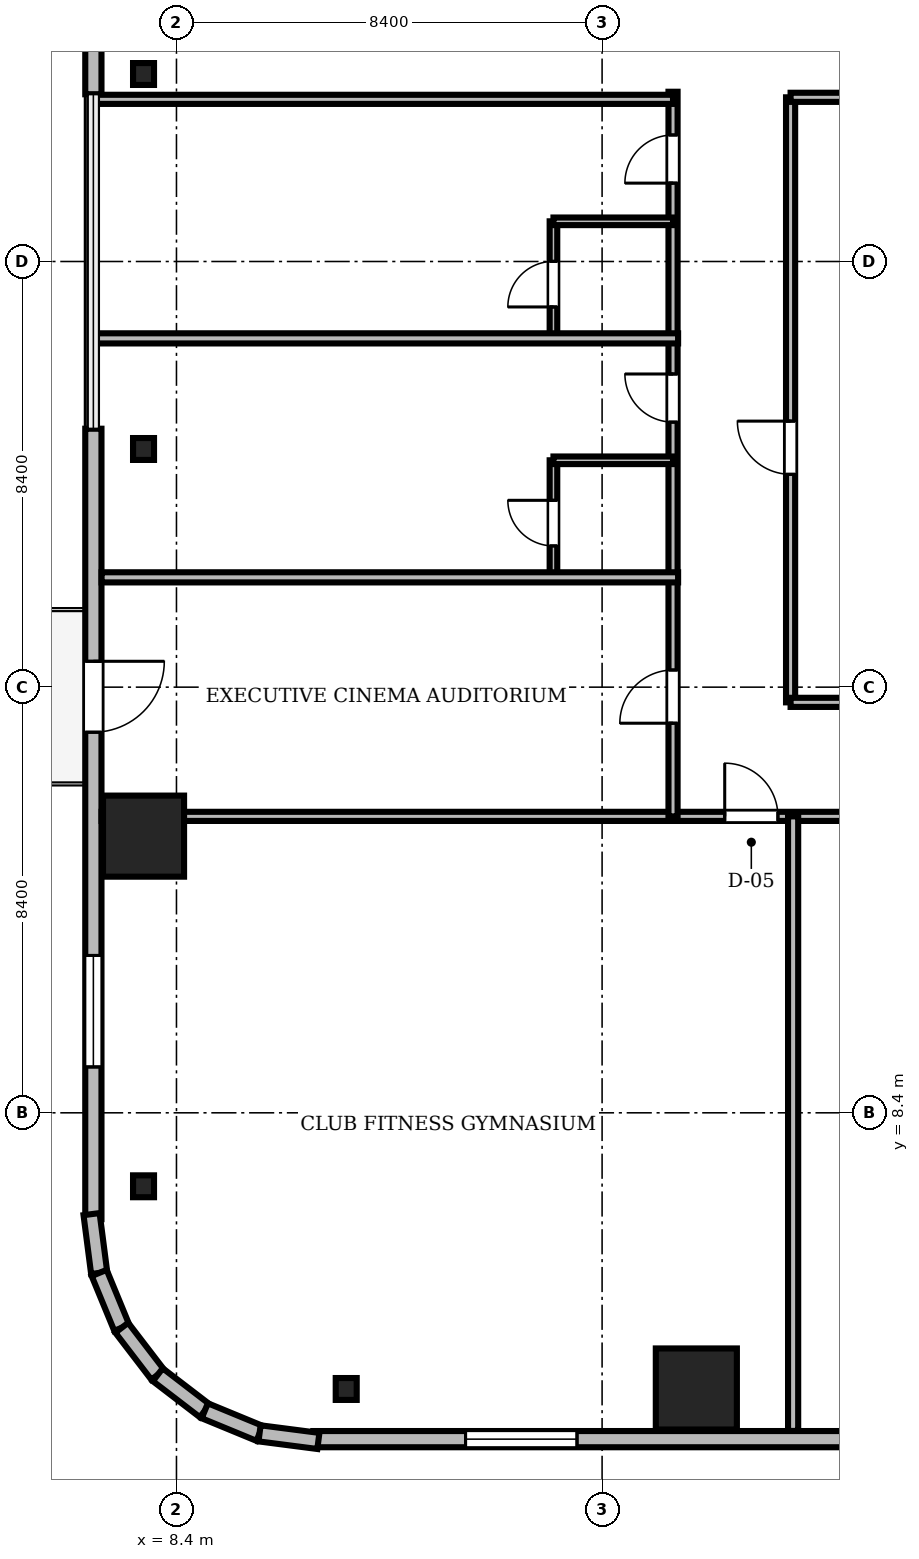
"""IFC4 building model, lengths in metres.
Left out: names, types, materials, properties, quantities, classifications, styles, units other than length and angle.
Written with IfcOpenShell. Run it as: python <this file> out.ifc"""

import sys

from ifc_helpers import new_model, si_unit, direction, frame, frame_2d, origin, origin_2d, place, context, subcontext, project, spatial, rectangle, i_section, extrude, source, transform, mapped, element, fill, save


model = new_model("IFC4")
c1 = context("Model", 3, precision=1e-05, world=origin(), true_north=direction((0.0, 1.0)))
c2 = subcontext(c1, "Body", "Model", "MODEL_VIEW")
j1 = project(units=[si_unit("LENGTHUNIT", "METRE"), si_unit("PLANEANGLEUNIT", "RADIAN")], contexts=[c1])
p1 = place(None, origin())
s1 = spatial("IfcSite", under=j1, at=p1, CompositionType="ELEMENT")
p2 = place(p1, origin())
s2 = spatial("IfcBuilding", under=s1, at=p2, CompositionType="ELEMENT")
p3 = place(p2, frame((0.0, 0.0, 129.8)))
s3 = spatial("IfcBuildingStorey", under=s2, at=p3, CompositionType="ELEMENT", Elevation=129.8)
m1 = source(origin(), c2, "Body", "SweptSolid", [
    extrude(rectangle(XDim=1.6, YDim=1.6, at=origin_2d()), origin(), (0.0, 0.0, 1.0), 3.46),
])
for number, where, z_axis, x_axis in (
    (1, (18.66, 2.95, 0.0), (0.0, 0.0, 1.0), (1.0, 0.0, 0.0)),
    (2, (7.75, 13.86, 0.0), (0.0, 0.0, 1.0), (1.0, 0.0, 0.0)),
):
    element("IfcColumn", number, at=place(p3, frame(where, z_axis=z_axis, x_axis=x_axis)), inside=s3, PredefinedType="COLUMN", context=c2, shape_type="MappedRepresentation", body=[
        mapped(m1, transform((0.0, 0.0, 0.0), scale=1.0)),
    ])
m2 = source(origin(), c2, "Body", "SweptSolid", [
    extrude(i_section(OverallWidth=0.414, OverallDepth=0.432, WebThickness=0.026, FlangeThickness=0.04, FilletRadius=0.015, at=origin_2d()), origin(), (0.0, 0.0, 1.0), 3.46),
])
for number, where, z_axis, x_axis in (
    (3, (11.75, 2.95, 0.0), (0.0, 0.0, 1.0), (1.0, 0.0, 0.0)),
    (4, (7.75, 28.9, 0.0), (0.0, 0.0, 1.0), (1.0, 0.0, 0.0)),
    (5, (7.75, 21.5, 0.0), (0.0, 0.0, 1.0), (1.0, 0.0, 0.0)),
    (6, (7.75, 6.95, 0.0), (0.0, 0.0, 1.0), (1.0, 0.0, 0.0)),
):
    element("IfcColumn", number, at=place(p3, frame(where, z_axis=z_axis, x_axis=x_axis)), inside=s3, PredefinedType="COLUMN", context=c2, shape_type="MappedRepresentation", body=[
        mapped(m2, transform((0.0, 0.0, 0.0), scale=1.0)),
    ])
m3 = source(origin(), c2, "Body", "SweptSolid", [
    extrude(rectangle(XDim=15.6, YDim=0.32, at=frame_2d((7.8, 0.0))), origin(), (0.0, 0.0, 1.0), 3.46),
])
p4 = place(p3, frame((11.1, 1.96, 0.0), z_axis=(0.0, 0.0, 1.0), x_axis=(1.0, 0.0, 0.0)))
e7 = element("IfcWall", 7, at=p4, inside=s3, PredefinedType="SOLIDWALL", context=c2, shape_type="MappedRepresentation", body=[
    mapped(m3, transform((0.0, 0.0, 0.0), scale=1.0)),
])
m4 = source(origin(), c2, "Body", "SweptSolid", [
    extrude(rectangle(XDim=2.2, YDim=2.4, at=frame_2d((1.1, 1.2))), frame((0.0, 0.17, 0.0), z_axis=(0.0, -1.0, 0.0), x_axis=(1.0, 0.0, 0.0)), (0.0, 0.0, 1.0), 0.34),
])
p5 = place(p4, frame((3.005, 0.0, 0.72)))
e8 = element("IfcOpeningElement", 8, at=p5, cuts=e7, PredefinedType="OPENING", context=c2, shape_type="MappedRepresentation", body=[
    mapped(m4, transform((0.0, 0.0, 0.0), scale=1.0)),
])
m5 = source(origin(), c2, "Body", "SweptSolid", [
    extrude(rectangle(XDim=15.6, YDim=0.32, at=frame_2d((7.8, 0.0))), origin(), (0.0, 0.0, 1.0), 3.46),
])
p6 = place(p3, frame((6.76, 44.1, 0.0), z_axis=(0.0, 0.0, 1.0), x_axis=(0.0, -1.0, 0.0)))
e9 = element("IfcWall", 9, at=p6, inside=s3, PredefinedType="SOLIDWALL", context=c2, shape_type="MappedRepresentation", body=[
    mapped(m5, transform((0.0, 0.0, 0.0), scale=1.0)),
])
p7 = place(p6, frame((3.005, 0.0, 0.72)))
e10 = element("IfcOpeningElement", 10, at=p7, cuts=e9, PredefinedType="OPENING", context=c2, shape_type="MappedRepresentation", body=[
    mapped(m4, transform((0.0, 0.0, 0.0), scale=1.0)),
])
p8 = place(p3, frame((6.76, 21.9, 0.0), z_axis=(0.0, 0.0, 1.0), x_axis=(0.0, -1.0, 0.0)))
e11 = element("IfcWall", 11, at=p8, inside=s3, PredefinedType="SOLIDWALL", context=c2, shape_type="MappedRepresentation", body=[
    mapped(m3, transform((0.0, 0.0, 0.0), scale=1.0)),
])
m6 = source(origin(), c2, "Body", "SweptSolid", [
    extrude(rectangle(XDim=1.4, YDim=2.3, at=frame_2d((0.7, 1.15))), frame((0.0, 0.17, 0.0), z_axis=(0.0, -1.0, 0.0), x_axis=(1.0, 0.0, 0.0)), (0.0, 0.0, 1.0), 0.34),
])
p9 = place(p8, frame((4.59, 0.0, 0.0)))
e12 = element("IfcOpeningElement", 12, at=p9, cuts=e11, PredefinedType="OPENING", context=c2, shape_type="MappedRepresentation", body=[
    mapped(m6, transform((0.0, 0.0, 0.0), scale=1.0)),
])
p10 = place(p8, frame((10.395, 0.0, 0.72)))
e13 = element("IfcOpeningElement", 13, at=p10, cuts=e11, PredefinedType="OPENING", context=c2, shape_type="MappedRepresentation", body=[
    mapped(m4, transform((0.0, 0.0, 0.0), scale=1.0)),
])
m7 = source(origin(), c2, "Body", "SweptSolid", [
    extrude(rectangle(XDim=1.171, YDim=0.32, at=frame_2d((0.585, 0.0))), origin(), (0.0, 0.0, 1.0), 3.46),
])
p11 = place(p3, frame((6.724, 6.401, 0.0), z_axis=(0.0, 0.0, 1.0), x_axis=(0.128269133229, -0.991739395941, 0.0)))
e14 = element("IfcWall", 14, at=p11, inside=s3, PredefinedType="SOLIDWALL", context=c2, shape_type="MappedRepresentation", body=[
    mapped(m7, transform((0.0, 0.0, 0.0), scale=1.0)),
])
m8 = source(origin(), c2, "Body", "SweptSolid", [
    extrude(rectangle(XDim=1.169, YDim=0.32, at=frame_2d((0.584, 0.0))), origin(), (0.0, 0.0, 1.0), 3.46),
])
for number, where, z_axis, x_axis in (
    (15, (6.875, 5.24, 0.0), (0.0, 0.0, 1.0), (0.381, -0.925, 0.0)),
    (16, (7.32, 4.159, 0.0), (0.0, 0.0, 1.0), (0.608, -0.794, 0.0)),
):
    element("IfcWall", number, at=place(p3, frame(where, z_axis=z_axis, x_axis=x_axis)), inside=s3, PredefinedType="SOLIDWALL", context=c2, shape_type="MappedRepresentation", body=[
        mapped(m8, transform((0.0, 0.0, 0.0), scale=1.0)),
    ])
m9 = source(origin(), c2, "Body", "SweptSolid", [
    extrude(rectangle(XDim=1.169, YDim=0.32, at=frame_2d((0.584, 0.0))), origin(), (0.0, 0.0, 1.0), 3.46),
])
p12 = place(p3, frame((8.031, 3.231, 0.0), z_axis=(0.0, 0.0, 1.0), x_axis=(0.793663520347, -0.608356981114, 0.0)))
e17 = element("IfcWall", 17, at=p12, inside=s3, PredefinedType="SOLIDWALL", context=c2, shape_type="MappedRepresentation", body=[
    mapped(m9, transform((0.0, 0.0, 0.0), scale=1.0)),
])
m10 = source(origin(), c2, "Body", "SweptSolid", [
    extrude(rectangle(XDim=1.169, YDim=0.32, at=frame_2d((0.585, 0.0))), origin(), (0.0, 0.0, 1.0), 3.46),
])
p13 = place(p3, frame((8.959, 2.52, 0.0), z_axis=(0.0, 0.0, 1.0), x_axis=(0.924479075121, -0.381232789334, 0.0)))
e18 = element("IfcWall", 18, at=p13, inside=s3, PredefinedType="SOLIDWALL", context=c2, shape_type="MappedRepresentation", body=[
    mapped(m10, transform((0.0, 0.0, 0.0), scale=1.0)),
])
m11 = source(origin(), c2, "Body", "SweptSolid", [
    extrude(rectangle(XDim=1.17, YDim=0.32, at=frame_2d((0.585, 0.0))), origin(), (0.0, 0.0, 1.0), 3.46),
])
p14 = place(p3, frame((10.04, 2.074, 0.0), z_axis=(0.0, 0.0, 1.0), x_axis=(0.991762485493, -0.128090485085, 0.0)))
e19 = element("IfcWall", 19, at=p14, inside=s3, PredefinedType="SOLIDWALL", context=c2, shape_type="MappedRepresentation", body=[
    mapped(m11, transform((0.0, 0.0, 0.0), scale=1.0)),
])
m12 = source(origin(), c2, "Body", "SweptSolid", [
    extrude(rectangle(XDim=46.156, YDim=0.18, at=frame_2d((23.078, 0.0))), origin(), (0.0, 0.0, 1.0), 2.702),
])
p15 = place(p3, frame((6.922, 14.25, 0.0), z_axis=(0.0, 0.0, 1.0), x_axis=(1.0, 0.0, 0.0)))
e20 = element("IfcWall", 20, at=p15, inside=s3, PredefinedType="PARTITIONING", context=c2, shape_type="MappedRepresentation", body=[
    mapped(m12, transform((0.0, 0.0, 0.0), scale=1.0)),
])
m13 = source(origin(), c2, "Body", "SweptSolid", [
    extrude(rectangle(XDim=1.05, YDim=2.2, at=frame_2d((0.525, 1.1))), frame((0.0, 0.1, 0.0), z_axis=(0.0, -1.0, 0.0), x_axis=(1.0, 0.0, 0.0)), (0.0, 0.0, 1.0), 0.2),
])
p16 = place(p15, frame((12.298, 0.0, 0.0)))
e21 = element("IfcOpeningElement", 21, at=p16, cuts=e20, PredefinedType="OPENING", context=c2, shape_type="MappedRepresentation", body=[
    mapped(m13, transform((0.0, 0.0, 0.0), scale=1.0)),
])
p17 = place(p15, frame((14.853, 0.0, 0.0)))
e22 = element("IfcOpeningElement", 22, at=p17, cuts=e20, PredefinedType="OPENING", context=c2, shape_type="MappedRepresentation", body=[
    mapped(m13, transform((0.0, 0.0, 0.0), scale=1.0)),
])
p18 = place(p15, frame((18.556, 0.0, 0.0)))
e23 = element("IfcOpeningElement", 23, at=p18, cuts=e20, PredefinedType="OPENING", context=c2, shape_type="MappedRepresentation", body=[
    mapped(m13, transform((0.0, 0.0, 0.0), scale=1.0)),
])
m14 = source(origin(), c2, "Body", "SweptSolid", [
    extrude(rectangle(XDim=0.95, YDim=2.15, at=frame_2d((0.475, 1.075))), frame((0.0, 0.1, 0.0), z_axis=(0.0, -1.0, 0.0), x_axis=(1.0, 0.0, 0.0)), (0.0, 0.0, 1.0), 0.2),
])
p19 = place(p15, frame((23.985, 0.0, 0.0)))
e24 = element("IfcOpeningElement", 24, at=p19, cuts=e20, PredefinedType="OPENING", context=c2, shape_type="MappedRepresentation", body=[
    mapped(m14, transform((0.0, 0.0, 0.0), scale=1.0)),
])
p20 = place(p15, frame((27.213, 0.0, 0.0)))
e25 = element("IfcOpeningElement", 25, at=p20, cuts=e20, PredefinedType="OPENING", context=c2, shape_type="MappedRepresentation", body=[
    mapped(m13, transform((0.0, 0.0, 0.0), scale=1.0)),
])
p21 = place(p15, frame((31.666, 0.0, 0.0)))
e26 = element("IfcOpeningElement", 26, at=p21, cuts=e20, PredefinedType="OPENING", context=c2, shape_type="MappedRepresentation", body=[
    mapped(m13, transform((0.0, 0.0, 0.0), scale=1.0)),
])
p22 = place(p15, frame((36.869, 0.0, 0.0)))
e27 = element("IfcOpeningElement", 27, at=p22, cuts=e20, PredefinedType="OPENING", context=c2, shape_type="MappedRepresentation", body=[
    mapped(m13, transform((0.0, 0.0, 0.0), scale=1.0)),
])
p23 = place(p15, frame((41.828, 0.0, 0.0)))
e28 = element("IfcOpeningElement", 28, at=p23, cuts=e20, PredefinedType="OPENING", context=c2, shape_type="MappedRepresentation", body=[
    mapped(m13, transform((0.0, 0.0, 0.0), scale=1.0)),
])
m15 = source(origin(), c2, "Body", "SweptSolid", [
    extrude(rectangle(XDim=14.3, YDim=0.18, at=frame_2d((7.15, 0.0))), origin(), (0.0, 0.0, 1.0), 2.852),
])
p24 = place(p3, frame((18.2, 14.25, 0.0), z_axis=(0.0, 0.0, 1.0), x_axis=(0.0, 1.0, 0.0)))
e29 = element("IfcWall", 29, at=p24, inside=s3, PredefinedType="PARTITIONING", context=c2, shape_type="MappedRepresentation", body=[
    mapped(m15, transform((0.0, 0.0, 0.0), scale=1.0)),
])
p25 = place(p24, frame((1.838, 0.0, 0.0)))
e30 = element("IfcOpeningElement", 30, at=p25, cuts=e29, PredefinedType="OPENING", context=c2, shape_type="MappedRepresentation", body=[
    mapped(m13, transform((0.0, 0.0, 0.0), scale=1.0)),
])
p26 = place(p24, frame((7.78, 0.0, 0.0)))
e31 = element("IfcOpeningElement", 31, at=p26, cuts=e29, PredefinedType="OPENING", context=c2, shape_type="MappedRepresentation", body=[
    mapped(m14, transform((0.0, 0.0, 0.0), scale=1.0)),
])
p27 = place(p24, frame((12.497, 0.0, 0.0)))
e32 = element("IfcOpeningElement", 32, at=p27, cuts=e29, PredefinedType="OPENING", context=c2, shape_type="MappedRepresentation", body=[
    mapped(m14, transform((0.0, 0.0, 0.0), scale=1.0)),
])
m16 = source(origin(), c2, "Body", "SweptSolid", [
    extrude(rectangle(XDim=11.94, YDim=0.18, at=frame_2d((5.97, 0.0))), origin(), (0.0, 0.0, 1.0), 2.852),
])
p28 = place(p3, frame((20.52, 16.5, 0.0), z_axis=(0.0, 0.0, 1.0), x_axis=(0.0, 1.0, 0.0)))
e33 = element("IfcWall", 33, at=p28, inside=s3, PredefinedType="PARTITIONING", context=c2, shape_type="MappedRepresentation", body=[
    mapped(m16, transform((0.0, 0.0, 0.0), scale=1.0)),
])
p29 = place(p28, frame((4.5, 0.0, 0.0)))
e34 = element("IfcOpeningElement", 34, at=p29, cuts=e33, PredefinedType="OPENING", context=c2, shape_type="MappedRepresentation", body=[
    mapped(m13, transform((0.0, 0.0, 0.0), scale=1.0)),
])
m17 = source(origin(), c2, "Body", "SweptSolid", [
    extrude(rectangle(XDim=2.29, YDim=0.15, at=frame_2d((1.145, 0.0))), origin(), (0.0, 0.0, 1.0), 2.852),
])
p30 = place(p3, frame((15.84, 18.987, 0.0), z_axis=(0.0, 0.0, 1.0), x_axis=(0.0, 1.0, 0.0)))
e35 = element("IfcWall", 35, at=p30, inside=s3, PredefinedType="PARTITIONING", context=c2, shape_type="MappedRepresentation", body=[
    mapped(m17, transform((0.0, 0.0, 0.0), scale=1.0)),
])
m18 = source(origin(), c2, "Body", "SweptSolid", [
    extrude(rectangle(XDim=0.9, YDim=2.1, at=frame_2d((0.45, 1.05))), frame((0.0, 0.085, 0.0), z_axis=(0.0, -1.0, 0.0), x_axis=(1.0, 0.0, 0.0)), (0.0, 0.0, 1.0), 0.17),
])
p31 = place(p30, frame((0.6, 0.0, 0.0)))
e36 = element("IfcOpeningElement", 36, at=p31, cuts=e35, PredefinedType="OPENING", context=c2, shape_type="MappedRepresentation", body=[
    mapped(m18, transform((0.0, 0.0, 0.0), scale=1.0)),
])
m19 = source(origin(), c2, "Body", "SweptSolid", [
    extrude(rectangle(XDim=2.29, YDim=0.15, at=frame_2d((1.145, 0.0))), origin(), (0.0, 0.0, 1.0), 3.46),
])
p32 = place(p3, frame((15.84, 23.703, 0.0), z_axis=(0.0, 0.0, 1.0), x_axis=(0.0, 1.0, 0.0)))
e37 = element("IfcWall", 37, at=p32, inside=s3, PredefinedType="PARTITIONING", context=c2, shape_type="MappedRepresentation", body=[
    mapped(m19, transform((0.0, 0.0, 0.0), scale=1.0)),
])
p33 = place(p32, frame((0.6, 0.0, 0.0)))
e38 = element("IfcOpeningElement", 38, at=p33, cuts=e37, PredefinedType="OPENING", context=c2, shape_type="MappedRepresentation", body=[
    mapped(m18, transform((0.0, 0.0, 0.0), scale=1.0)),
])
m20 = source(origin(), c2, "Body", "SweptSolid", [
    extrude(rectangle(XDim=12.128, YDim=0.2, at=frame_2d((6.064, 0.0))), origin(), (0.0, 0.0, 1.0), 2.702),
])
p34 = place(p3, frame((20.57, 2.122, 0.0), z_axis=(0.0, 0.0, 1.0), x_axis=(0.0, 1.0, 0.0)))
e39 = element("IfcWall", 39, at=p34, inside=s3, PredefinedType="PARTITIONING", context=c2, shape_type="MappedRepresentation", body=[
    mapped(m20, transform((0.0, 0.0, 0.0), scale=1.0)),
])
m21 = source(origin(), c2, "Body", "SweptSolid", [
    extrude(rectangle(XDim=11.378, YDim=0.2, at=frame_2d((5.689, 0.0))), origin(), (0.0, 0.0, 1.0), 2.702),
])
p35 = place(p3, frame((6.922, 18.967, 0.0), z_axis=(0.0, 0.0, 1.0), x_axis=(1.0, 0.0, 0.0)))
e40 = element("IfcWall", 40, at=p35, inside=s3, PredefinedType="PARTITIONING", context=c2, shape_type="MappedRepresentation", body=[
    mapped(m21, transform((0.0, 0.0, 0.0), scale=1.0)),
])
m22 = source(origin(), c2, "Body", "SweptSolid", [
    extrude(rectangle(XDim=11.57, YDim=0.2, at=frame_2d((5.785, 0.0))), origin(), (0.0, 0.0, 1.0), 2.702),
])
p36 = place(p3, frame((6.73, 23.683, 0.0), z_axis=(0.0, 0.0, 1.0), x_axis=(1.0, 0.0, 0.0)))
e41 = element("IfcWall", 41, at=p36, inside=s3, PredefinedType="PARTITIONING", context=c2, shape_type="MappedRepresentation", body=[
    mapped(m22, transform((0.0, 0.0, 0.0), scale=1.0)),
])
m23 = source(origin(), c2, "Body", "SweptSolid", [
    extrude(rectangle(XDim=11.47, YDim=0.18, at=frame_2d((5.735, 0.0))), origin(), (0.0, 0.0, 1.0), 2.702),
])
p37 = place(p3, frame((6.73, 28.4, 0.0), z_axis=(0.0, 0.0, 1.0), x_axis=(1.0, 0.0, 0.0)))
e42 = element("IfcWall", 42, at=p37, inside=s3, PredefinedType="PARTITIONING", context=c2, shape_type="MappedRepresentation", body=[
    mapped(m23, transform((0.0, 0.0, 0.0), scale=1.0)),
])
m24 = source(origin(), c2, "Body", "SweptSolid", [
    extrude(rectangle(XDim=7.88, YDim=0.18, at=frame_2d((3.94, 0.0))), origin(), (0.0, 0.0, 1.0), 3.46),
])
for number, where, z_axis, x_axis in (
    (43, (20.52, 16.5, 0.0), (0.0, 0.0, 1.0), (1.0, 0.0, 0.0)),
    (44, (20.52, 28.44, 0.0), (0.0, 0.0, 1.0), (1.0, 0.0, 0.0)),
):
    element("IfcWall", number, at=place(p3, frame(where, z_axis=z_axis, x_axis=x_axis)), inside=s3, PredefinedType="PARTITIONING", context=c2, shape_type="MappedRepresentation", body=[
        mapped(m24, transform((0.0, 0.0, 0.0), scale=1.0)),
    ])
m25 = source(origin(), c2, "Body", "SweptSolid", [
    extrude(rectangle(XDim=2.36, YDim=0.15, at=frame_2d((1.18, 0.0))), origin(), (0.0, 0.0, 1.0), 3.46),
])
for number, where, z_axis, x_axis in (
    (45, (15.84, 21.277, 0.0), (0.0, 0.0, 1.0), (1.0, 0.0, 0.0)),
    (46, (15.84, 25.993, 0.0), (0.0, 0.0, 1.0), (1.0, 0.0, 0.0)),
):
    element("IfcWall", number, at=place(p3, frame(where, z_axis=z_axis, x_axis=x_axis)), inside=s3, PredefinedType="PARTITIONING", context=c2, shape_type="MappedRepresentation", body=[
        mapped(m25, transform((0.0, 0.0, 0.0), scale=1.0)),
    ])
m26 = source(origin(), c2, "Body", "SweptSolid", [
    extrude(rectangle(XDim=2.2, YDim=2.4, at=frame_2d((1.1, 1.2))), frame((0.0, 0.03, 0.0), z_axis=(0.0, -1.0, 0.0), x_axis=(1.0, 0.0, 0.0)), (0.0, 0.0, 1.0), 0.06),
])
p38 = place(p5, origin())
e47 = element("IfcWindow", 47, at=p38, inside=s3, PartitioningType="SINGLE_PANEL", PredefinedType="WINDOW", context=c2, shape_type="MappedRepresentation", body=[
    mapped(m26, transform((0.0, 0.0, 0.0), scale=1.0)),
])
fill(e8, e47)
m27 = source(origin(), c2, "Body", "SweptSolid", [
    extrude(rectangle(XDim=1.4, YDim=2.3, at=frame_2d((0.7, 1.15))), frame((0.0, 0.025, 0.0), z_axis=(0.0, -1.0, 0.0), x_axis=(1.0, 0.0, 0.0)), (0.0, 0.0, 1.0), 0.05),
])
p39 = place(p9, frame((1.4, 0.0, 0.0), z_axis=(0.0, 0.0, 1.0), x_axis=(-1.0, 0.0, 0.0)))
e48 = element("IfcDoor", 48, at=p39, inside=s3, OperationType="DOUBLE_DOOR_SLIDING", PredefinedType="DOOR", context=c2, shape_type="MappedRepresentation", body=[
    mapped(m27, transform((0.0, 0.0, 0.0), scale=1.0)),
])
fill(e12, e48)
p40 = place(p10, origin())
e49 = element("IfcWindow", 49, at=p40, inside=s3, PartitioningType="SINGLE_PANEL", PredefinedType="WINDOW", context=c2, shape_type="MappedRepresentation", body=[
    mapped(m26, transform((0.0, 0.0, 0.0), scale=1.0)),
])
fill(e13, e49)
m28 = source(origin(), c2, "Body", "SweptSolid", [
    extrude(rectangle(XDim=1.05, YDim=2.2, at=frame_2d((0.525, 1.1))), frame((0.0, 0.025, 0.0), z_axis=(0.0, -1.0, 0.0), x_axis=(1.0, 0.0, 0.0)), (0.0, 0.0, 1.0), 0.05),
])
p41 = place(p16, origin())
e50 = element("IfcDoor", 50, at=p41, inside=s3, OperationType="SINGLE_SWING_LEFT", PredefinedType="DOOR", context=c2, shape_type="MappedRepresentation", body=[
    mapped(m28, transform((0.0, 0.0, 0.0), scale=1.0)),
])
fill(e21, e50)
p42 = place(p25, origin())
e51 = element("IfcDoor", 51, at=p42, inside=s3, OperationType="SINGLE_SWING_LEFT", PredefinedType="DOOR", context=c2, shape_type="MappedRepresentation", body=[
    mapped(m28, transform((0.0, 0.0, 0.0), scale=1.0)),
])
fill(e30, e51)
m29 = source(origin(), c2, "Body", "SweptSolid", [
    extrude(rectangle(XDim=0.95, YDim=2.15, at=frame_2d((0.475, 1.075))), frame((0.0, 0.025, 0.0), z_axis=(0.0, -1.0, 0.0), x_axis=(1.0, 0.0, 0.0)), (0.0, 0.0, 1.0), 0.05),
])
p43 = place(p26, origin())
e52 = element("IfcDoor", 52, at=p43, inside=s3, OperationType="SINGLE_SWING_RIGHT", PredefinedType="DOOR", context=c2, shape_type="MappedRepresentation", body=[
    mapped(m29, transform((0.0, 0.0, 0.0), scale=1.0)),
])
fill(e31, e52)
p44 = place(p27, origin())
e53 = element("IfcDoor", 53, at=p44, inside=s3, OperationType="SINGLE_SWING_LEFT", PredefinedType="DOOR", context=c2, shape_type="MappedRepresentation", body=[
    mapped(m29, transform((0.0, 0.0, 0.0), scale=1.0)),
])
fill(e32, e53)
p45 = place(p29, origin())
e54 = element("IfcDoor", 54, at=p45, inside=s3, OperationType="SINGLE_SWING_RIGHT", PredefinedType="DOOR", context=c2, shape_type="MappedRepresentation", body=[
    mapped(m28, transform((0.0, 0.0, 0.0), scale=1.0)),
])
fill(e34, e54)
m30 = source(origin(), c2, "Body", "SweptSolid", [
    extrude(rectangle(XDim=0.9, YDim=2.1, at=frame_2d((0.45, 1.05))), frame((0.0, 0.025, 0.0), z_axis=(0.0, -1.0, 0.0), x_axis=(1.0, 0.0, 0.0)), (0.0, 0.0, 1.0), 0.05),
])
p46 = place(p31, origin())
e55 = element("IfcDoor", 55, at=p46, inside=s3, OperationType="SINGLE_SWING_RIGHT", PredefinedType="DOOR", context=c2, shape_type="MappedRepresentation", body=[
    mapped(m30, transform((0.0, 0.0, 0.0), scale=1.0)),
])
fill(e36, e55)
p47 = place(p33, origin())
e56 = element("IfcDoor", 56, at=p47, inside=s3, OperationType="SINGLE_SWING_LEFT", PredefinedType="DOOR", context=c2, shape_type="MappedRepresentation", body=[
    mapped(m30, transform((0.0, 0.0, 0.0), scale=1.0)),
])
fill(e38, e56)
save(model, sys.argv[1])
